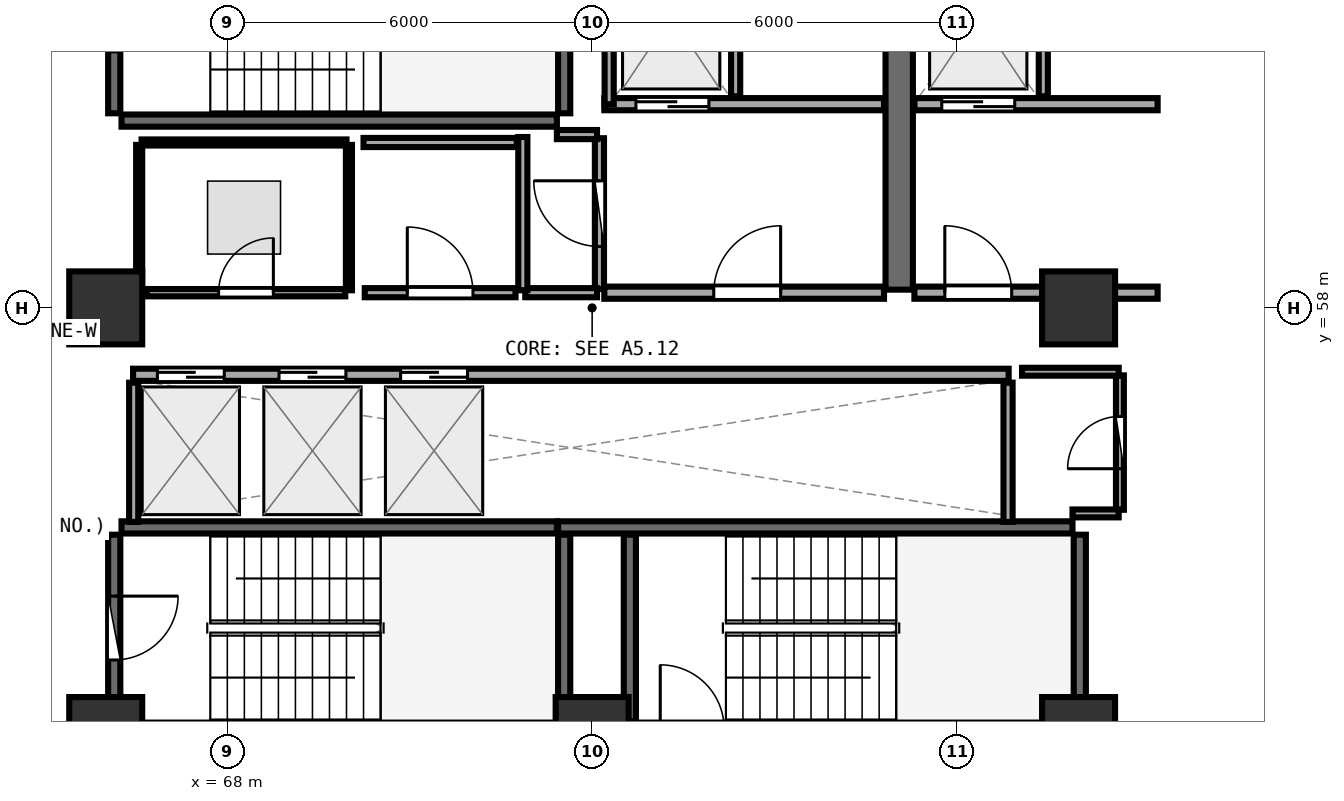
"""IFC4 building model, lengths in metres.
Left out: names, types, materials, properties, quantities, classifications, styles, units other than length and angle.
Written with IfcOpenShell. Run it as: python <this file> out.ifc"""

import sys

from ifc_helpers import new_model, si_unit, direction, frame, frame_2d, origin, origin_2d, place, context, subcontext, project, spatial, rectangle, extrude, element, fill, save


model = new_model("IFC4")
c1 = context("Model", 3, precision=1e-05, world=origin(), true_north=direction((0.0, 1.0)))
c2 = subcontext(c1, "Body", "Model", "MODEL_VIEW")
j1 = project(units=[si_unit("LENGTHUNIT", "METRE"), si_unit("PLANEANGLEUNIT", "RADIAN")], contexts=[c1])
p1 = place(None, origin())
s1 = spatial("IfcSite", under=j1, at=p1, CompositionType="ELEMENT")
p2 = place(p1, origin())
s2 = spatial("IfcBuilding", under=s1, at=p2, CompositionType="ELEMENT")
p3 = place(p2, frame((0.0, 0.0, 135.6)))
s3 = spatial("IfcBuildingStorey", under=s2, at=p3, CompositionType="ELEMENT", Elevation=135.6)
for number, where, z_axis, x_axis in (
    (1, (66.0, 51.0, 0.0), (0.0, 0.0, 1.0), (1.0, 0.0, 0.0)),
    (2, (74.0, 51.0, 0.0), (0.0, 0.0, 1.0), (1.0, 0.0, 0.0)),
    (3, (82.0, 51.0, 0.0), (0.0, 0.0, 1.0), (1.0, 0.0, 0.0)),
    (4, (82.0, 58.0, 0.0), (0.0, 0.0, 1.0), (1.0, 0.0, 0.0)),
    (5, (66.0, 58.0, 0.0), (0.0, 0.0, 1.0), (1.0, 0.0, 0.0)),
):
    element("IfcColumn", number, at=place(p3, frame(where, z_axis=z_axis, x_axis=x_axis)), inside=s3, PredefinedType="PILASTER", context=c2, shape_type="SweptSolid", body=[
        extrude(rectangle(XDim=1.2, YDim=1.2, at=origin_2d()), origin(), (0.0, 0.0, 1.0), 3.75),
    ])
p4 = place(p3, frame((66.26, 61.08, 0.0), z_axis=(0.0, 0.0, 1.0), x_axis=(1.0, 0.0, 0.0)))
e6 = element("IfcWall", 6, at=p4, inside=s3, PredefinedType="SHEAR", context=c2, shape_type="SweptSolid", body=[
    extrude(rectangle(XDim=7.16, YDim=0.2, at=frame_2d((3.58, 0.0))), origin(), (0.0, 0.0, 1.0), 3.49),
])
p5 = place(p3, frame((73.54, 61.2, 0.0), z_axis=(0.0, 0.0, 1.0), x_axis=(0.0, 1.0, 0.0)))
e7 = element("IfcWall", 7, at=p5, inside=s3, PredefinedType="SHEAR", context=c2, shape_type="SweptSolid", body=[
    extrude(rectangle(XDim=3.07, YDim=0.2, at=frame_2d((1.535, 0.0))), origin(), (0.0, 0.0, 1.0), 3.49),
])
p6 = place(p3, frame((66.14, 64.27, 0.0), z_axis=(0.0, 0.0, 1.0), x_axis=(0.0, -1.0, 0.0)))
e8 = element("IfcWall", 8, at=p6, inside=s3, PredefinedType="SHEAR", context=c2, shape_type="SweptSolid", body=[
    extrude(rectangle(XDim=3.07, YDim=0.2, at=frame_2d((1.535, 0.0))), origin(), (0.0, 0.0, 1.0), 3.49),
])
p7 = place(p6, frame((1.01, 0.0, 0.0)))
e9 = element("IfcOpeningElement", 9, at=p7, cuts=e8, PredefinedType="OPENING", context=c2, shape_type="SweptSolid", body=[
    extrude(rectangle(XDim=1.05, YDim=2.1, at=frame_2d((0.525, 1.05))), frame((0.0, 0.11, 0.0), z_axis=(0.0, -1.0, 0.0), x_axis=(1.0, 0.0, 0.0)), (0.0, 0.0, 1.0), 0.22),
])
p8 = place(p3, frame((82.02, 51.2, 0.0), z_axis=(0.0, 0.0, 1.0), x_axis=(0.0, 1.0, 0.0)))
e10 = element("IfcWall", 10, at=p8, inside=s3, PredefinedType="SHEAR", context=c2, shape_type="SweptSolid", body=[
    extrude(rectangle(XDim=3.07, YDim=0.2, at=frame_2d((1.535, 0.0))), origin(), (0.0, 0.0, 1.0), 3.49),
])
p9 = place(p3, frame((81.9, 54.39, 0.0), z_axis=(0.0, 0.0, 1.0), x_axis=(-1.0, 0.0, 0.0)))
e11 = element("IfcWall", 11, at=p9, inside=s3, PredefinedType="SHEAR", context=c2, shape_type="SweptSolid", body=[
    extrude(rectangle(XDim=8.46, YDim=0.2, at=frame_2d((4.23, 0.0))), origin(), (0.0, 0.0, 1.0), 3.49),
])
for number, where, z_axis, x_axis in (
    (12, (74.62, 54.27, 0.0), (0.0, 0.0, 1.0), (0.0, -1.0, 0.0)),
    (13, (73.54, 51.2, 0.0), (0.0, 0.0, 1.0), (0.0, 1.0, 0.0)),
):
    element("IfcWall", number, at=place(p3, frame(where, z_axis=z_axis, x_axis=x_axis)), inside=s3, PredefinedType="SHEAR", context=c2, shape_type="SweptSolid", body=[
        extrude(rectangle(XDim=3.07, YDim=0.2, at=frame_2d((1.535, 0.0))), origin(), (0.0, 0.0, 1.0), 3.49),
    ])
p10 = place(p3, frame((73.42, 54.39, 0.0), z_axis=(0.0, 0.0, 1.0), x_axis=(-1.0, 0.0, 0.0)))
e14 = element("IfcWall", 14, at=p10, inside=s3, PredefinedType="SHEAR", context=c2, shape_type="SweptSolid", body=[
    extrude(rectangle(XDim=7.16, YDim=0.2, at=frame_2d((3.58, 0.0))), origin(), (0.0, 0.0, 1.0), 3.49),
])
p11 = place(p3, frame((66.14, 54.27, 0.0), z_axis=(0.0, 0.0, 1.0), x_axis=(0.0, -1.0, 0.0)))
e15 = element("IfcWall", 15, at=p11, inside=s3, PredefinedType="SHEAR", context=c2, shape_type="SweptSolid", body=[
    extrude(rectangle(XDim=3.07, YDim=0.2, at=frame_2d((1.535, 0.0))), origin(), (0.0, 0.0, 1.0), 3.49),
])
p12 = place(p11, frame((1.01, 0.0, 0.0)))
e16 = element("IfcOpeningElement", 16, at=p12, cuts=e15, PredefinedType="OPENING", context=c2, shape_type="SweptSolid", body=[
    extrude(rectangle(XDim=1.05, YDim=2.1, at=frame_2d((0.525, 1.05))), frame((0.0, 0.11, 0.0), z_axis=(0.0, -1.0, 0.0), x_axis=(1.0, 0.0, 0.0)), (0.0, 0.0, 1.0), 0.22),
])
p13 = place(p3, frame((79.05, 58.3, 0.0), z_axis=(0.0, 0.0, 1.0), x_axis=(0.0, 1.0, 0.0)))
e17 = element("IfcWall", 17, at=p13, inside=s3, PredefinedType="SHEAR", context=c2, shape_type="SweptSolid", body=[
    extrude(rectangle(XDim=6.3, YDim=0.45, at=frame_2d((3.15, 0.0))), origin(), (0.0, 0.0, 1.0), 3.49),
])
p14 = place(p3, frame((74.2, 61.35, 0.0), z_axis=(0.0, 0.0, 1.0), x_axis=(1.0, 0.0, 0.0)))
e18 = element("IfcWall", 18, at=p14, inside=s3, PredefinedType="SOLIDWALL", context=c2, shape_type="SweptSolid", body=[
    extrude(rectangle(XDim=4.6, YDim=0.2, at=frame_2d((2.3, 0.0))), origin(), (0.0, 0.0, 1.0), 3.48),
])
p15 = place(p14, frame((0.52, 0.0, 0.0)))
e19 = element("IfcOpeningElement", 19, at=p15, cuts=e18, PredefinedType="OPENING", context=c2, shape_type="SweptSolid", body=[
    extrude(rectangle(XDim=1.2, YDim=2.15, at=frame_2d((0.6, 1.075))), frame((0.0, 0.11, 0.0), z_axis=(0.0, -1.0, 0.0), x_axis=(1.0, 0.0, 0.0)), (0.0, 0.0, 1.0), 0.22),
])
p16 = place(p3, frame((74.28, 61.35, 0.0), z_axis=(0.0, 0.0, 1.0), x_axis=(0.0, 1.0, 0.0)))
e20 = element("IfcWall", 20, at=p16, inside=s3, PredefinedType="PARTITIONING", context=c2, shape_type="SweptSolid", body=[
    extrude(rectangle(XDim=2.97, YDim=0.15, at=frame_2d((1.485, 0.0))), origin(), (0.0, 0.0, 1.0), 3.48),
])
p17 = place(p3, frame((76.36, 61.48, 0.0), z_axis=(0.0, 0.0, 1.0), x_axis=(0.0, 1.0, 0.0)))
e21 = element("IfcWall", 21, at=p17, inside=s3, PredefinedType="PARTITIONING", context=c2, shape_type="SweptSolid", body=[
    extrude(rectangle(XDim=2.84, YDim=0.15, at=frame_2d((1.42, 0.0))), origin(), (0.0, 0.0, 1.0), 3.48),
])
p18 = place(p3, frame((79.3, 61.35, 0.0), z_axis=(0.0, 0.0, 1.0), x_axis=(1.0, 0.0, 0.0)))
e22 = element("IfcWall", 22, at=p18, inside=s3, PredefinedType="SOLIDWALL", context=c2, shape_type="SweptSolid", body=[
    extrude(rectangle(XDim=4.0, YDim=0.2, at=frame_2d((2.0, 0.0))), origin(), (0.0, 0.0, 1.0), 2.775),
])
p19 = place(p18, frame((0.45, 0.0, 0.0)))
e23 = element("IfcOpeningElement", 23, at=p19, cuts=e22, PredefinedType="OPENING", context=c2, shape_type="SweptSolid", body=[
    extrude(rectangle(XDim=1.2, YDim=2.15, at=frame_2d((0.6, 1.075))), frame((0.0, 0.11, 0.0), z_axis=(0.0, -1.0, 0.0), x_axis=(1.0, 0.0, 0.0)), (0.0, 0.0, 1.0), 0.22),
])
p20 = place(p3, frame((81.42, 61.48, 0.0), z_axis=(0.0, 0.0, 1.0), x_axis=(0.0, 1.0, 0.0)))
e24 = element("IfcWall", 24, at=p20, inside=s3, PredefinedType="PARTITIONING", context=c2, shape_type="SweptSolid", body=[
    extrude(rectangle(XDim=2.84, YDim=0.15, at=frame_2d((1.42, 0.0))), origin(), (0.0, 0.0, 1.0), 3.48),
])
p21 = place(p3, frame((74.2, 58.25, 0.0), z_axis=(0.0, 0.0, 1.0), x_axis=(1.0, 0.0, 0.0)))
e25 = element("IfcWall", 25, at=p21, inside=s3, PredefinedType="SOLIDWALL", context=c2, shape_type="SweptSolid", body=[
    extrude(rectangle(XDim=4.6, YDim=0.2, at=frame_2d((2.3, 0.0))), origin(), (0.0, 0.0, 1.0), 3.48),
])
p22 = place(p21, frame((1.8, 0.0, 0.0)))
e26 = element("IfcOpeningElement", 26, at=p22, cuts=e25, PredefinedType="OPENING", context=c2, shape_type="SweptSolid", body=[
    extrude(rectangle(XDim=1.1, YDim=2.1, at=frame_2d((0.55, 1.05))), frame((0.0, 0.11, 0.0), z_axis=(0.0, -1.0, 0.0), x_axis=(1.0, 0.0, 0.0)), (0.0, 0.0, 1.0), 0.22),
])
p23 = place(p3, frame((79.3, 58.25, 0.0), z_axis=(0.0, 0.0, 1.0), x_axis=(1.0, 0.0, 0.0)))
e27 = element("IfcWall", 27, at=p23, inside=s3, PredefinedType="SOLIDWALL", context=c2, shape_type="SweptSolid", body=[
    extrude(rectangle(XDim=4.0, YDim=0.2, at=frame_2d((2.0, 0.0))), origin(), (0.0, 0.0, 1.0), 2.775),
])
p24 = place(p23, frame((0.5, 0.0, 0.0)))
e28 = element("IfcOpeningElement", 28, at=p24, cuts=e27, PredefinedType="OPENING", context=c2, shape_type="SweptSolid", body=[
    extrude(rectangle(XDim=1.1, YDim=2.1, at=frame_2d((0.55, 1.05))), frame((0.0, 0.11, 0.0), z_axis=(0.0, -1.0, 0.0), x_axis=(1.0, 0.0, 0.0)), (0.0, 0.0, 1.0), 0.22),
])
p25 = place(p3, frame((66.45, 56.9, 0.0), z_axis=(0.0, 0.0, 1.0), x_axis=(1.0, 0.0, 0.0)))
e29 = element("IfcWall", 29, at=p25, inside=s3, PredefinedType="SOLIDWALL", context=c2, shape_type="SweptSolid", body=[
    extrude(rectangle(XDim=14.4, YDim=0.2, at=frame_2d((7.2, 0.0))), origin(), (0.0, 0.0, 1.0), 3.48),
])
p26 = place(p25, frame((0.4, 0.0, 0.0)))
e30 = element("IfcOpeningElement", 30, at=p26, cuts=e29, PredefinedType="OPENING", context=c2, shape_type="SweptSolid", body=[
    extrude(rectangle(XDim=1.1, YDim=2.1, at=frame_2d((0.55, 1.05))), frame((0.0, 0.11, 0.0), z_axis=(0.0, -1.0, 0.0), x_axis=(1.0, 0.0, 0.0)), (0.0, 0.0, 1.0), 0.22),
])
p27 = place(p25, frame((2.4, 0.0, 0.0)))
e31 = element("IfcOpeningElement", 31, at=p27, cuts=e29, PredefinedType="OPENING", context=c2, shape_type="SweptSolid", body=[
    extrude(rectangle(XDim=1.1, YDim=2.1, at=frame_2d((0.55, 1.05))), frame((0.0, 0.11, 0.0), z_axis=(0.0, -1.0, 0.0), x_axis=(1.0, 0.0, 0.0)), (0.0, 0.0, 1.0), 0.22),
])
p28 = place(p25, frame((4.4, 0.0, 0.0)))
e32 = element("IfcOpeningElement", 32, at=p28, cuts=e29, PredefinedType="OPENING", context=c2, shape_type="SweptSolid", body=[
    extrude(rectangle(XDim=1.1, YDim=2.1, at=frame_2d((0.55, 1.05))), frame((0.0, 0.11, 0.0), z_axis=(0.0, -1.0, 0.0), x_axis=(1.0, 0.0, 0.0)), (0.0, 0.0, 1.0), 0.22),
])
for number, where, z_axis, x_axis in (
    (33, (66.46, 54.48, 0.0), (0.0, 0.0, 1.0), (0.0, 1.0, 0.0)),
    (34, (80.84, 54.48, 0.0), (0.0, 0.0, 1.0), (0.0, 1.0, 0.0)),
):
    element("IfcWall", number, at=place(p3, frame(where, z_axis=z_axis, x_axis=x_axis)), inside=s3, PredefinedType="PARTITIONING", context=c2, shape_type="SweptSolid", body=[
        extrude(rectangle(XDim=2.29, YDim=0.15, at=frame_2d((1.145, 0.0))), origin(), (0.0, 0.0, 1.0), 3.48),
    ])
p29 = place(p3, frame((74.12, 58.31, 0.0), z_axis=(0.0, 0.0, 1.0), x_axis=(0.0, 1.0, 0.0)))
e35 = element("IfcWall", 35, at=p29, inside=s3, PredefinedType="PARTITIONING", context=c2, shape_type="SweptSolid", body=[
    extrude(rectangle(XDim=2.48, YDim=0.15, at=frame_2d((1.24, 0.0))), origin(), (0.0, 0.0, 1.0), 3.48),
])
p30 = place(p29, frame((0.7, 0.0, 0.0)))
e36 = element("IfcOpeningElement", 36, at=p30, cuts=e35, PredefinedType="OPENING", context=c2, shape_type="SweptSolid", body=[
    extrude(rectangle(XDim=1.08, YDim=2.1, at=frame_2d((0.54, 1.05))), frame((0.0, 0.085, 0.0), z_axis=(0.0, -1.0, 0.0), x_axis=(1.0, 0.0, 0.0)), (0.0, 0.0, 1.0), 0.17),
])
p31 = place(p3, frame((82.68, 54.68, 0.0), z_axis=(0.0, 0.0, 1.0), x_axis=(0.0, 1.0, 0.0)))
e37 = element("IfcWall", 37, at=p31, inside=s3, PredefinedType="PLUMBINGWALL", context=c2, shape_type="SweptSolid", body=[
    extrude(rectangle(XDim=2.21, YDim=0.13, at=frame_2d((1.105, 0.0))), origin(), (0.0, 0.0, 1.0), 3.48),
])
p32 = place(p31, frame((0.675, 0.0, 0.0)))
e38 = element("IfcOpeningElement", 38, at=p32, cuts=e37, PredefinedType="OPENING", context=c2, shape_type="SweptSolid", body=[
    extrude(rectangle(XDim=0.86, YDim=2.05, at=frame_2d((0.43, 1.025))), frame((0.0, 0.075, 0.0), z_axis=(0.0, -1.0, 0.0), x_axis=(1.0, 0.0, 0.0)), (0.0, 0.0, 1.0), 0.15),
])
p33 = place(p3, frame((66.675, 58.25, 0.0), z_axis=(0.0, 0.0, 1.0), x_axis=(1.0, 0.0, 0.0)))
e39 = element("IfcWall", 39, at=p33, inside=s3, PredefinedType="PARTITIONING", context=c2, shape_type="SweptSolid", body=[
    extrude(rectangle(XDim=3.265, YDim=0.12, at=frame_2d((1.632, 0.0))), origin(), (0.0, 0.0, 1.0), 3.48),
])
p34 = place(p33, frame((1.182, 0.0, 0.0)))
e40 = element("IfcOpeningElement", 40, at=p34, cuts=e39, PredefinedType="OPENING", context=c2, shape_type="SweptSolid", body=[
    extrude(rectangle(XDim=0.9, YDim=2.08, at=frame_2d((0.45, 1.04))), frame((0.0, 0.07, 0.0), z_axis=(0.0, -1.0, 0.0), x_axis=(1.0, 0.0, 0.0)), (0.0, 0.0, 1.0), 0.14),
])
p35 = place(p3, frame((70.26, 58.25, 0.0), z_axis=(0.0, 0.0, 1.0), x_axis=(1.0, 0.0, 0.0)))
e41 = element("IfcWall", 41, at=p35, inside=s3, PredefinedType="PARTITIONING", context=c2, shape_type="SweptSolid", body=[
    extrude(rectangle(XDim=2.48, YDim=0.15, at=frame_2d((1.24, 0.0))), origin(), (0.0, 0.0, 1.0), 3.48),
])
p36 = place(p35, frame((0.7, 0.0, 0.0)))
e42 = element("IfcOpeningElement", 42, at=p36, cuts=e41, PredefinedType="OPENING", context=c2, shape_type="SweptSolid", body=[
    extrude(rectangle(XDim=1.08, YDim=2.1, at=frame_2d((0.54, 1.05))), frame((0.0, 0.085, 0.0), z_axis=(0.0, -1.0, 0.0), x_axis=(1.0, 0.0, 0.0)), (0.0, 0.0, 1.0), 0.17),
])
p37 = place(p3, frame((72.9, 58.25, 0.0), z_axis=(0.0, 0.0, 1.0), x_axis=(1.0, 0.0, 0.0)))
e43 = element("IfcWall", 43, at=p37, inside=s3, PredefinedType="PARTITIONING", context=c2, shape_type="SweptSolid", body=[
    extrude(rectangle(XDim=1.18, YDim=0.15, at=frame_2d((0.59, 0.0))), origin(), (0.0, 0.0, 1.0), 3.48),
])
p38 = place(p3, frame((74.08, 60.85, 0.0), z_axis=(0.0, 0.0, 1.0), x_axis=(-1.0, 0.0, 0.0)))
e44 = element("IfcWall", 44, at=p38, inside=s3, PredefinedType="PARTITIONING", context=c2, shape_type="SweptSolid", body=[
    extrude(rectangle(XDim=0.66, YDim=0.15, at=frame_2d((0.33, 0.0))), origin(), (0.0, 0.0, 1.0), 3.48),
])
p39 = place(p3, frame((72.86, 60.81, 0.0), z_axis=(0.0, 0.0, 1.0), x_axis=(0.0, -1.0, 0.0)))
e45 = element("IfcWall", 45, at=p39, inside=s3, PredefinedType="PARTITIONING", context=c2, shape_type="SweptSolid", body=[
    extrude(rectangle(XDim=2.52, YDim=0.15, at=frame_2d((1.26, 0.0))), origin(), (0.0, 0.0, 1.0), 3.48),
])
p40 = place(p3, frame((81.9, 54.62, 0.0), z_axis=(0.0, 0.0, 1.0), x_axis=(1.0, 0.0, 0.0)))
e46 = element("IfcWall", 46, at=p40, inside=s3, PredefinedType="PLUMBINGWALL", context=c2, shape_type="SweptSolid", body=[
    extrude(rectangle(XDim=0.76, YDim=0.13, at=frame_2d((0.38, 0.0))), origin(), (0.0, 0.0, 1.0), 2.775),
])
p41 = place(p3, frame((82.66, 56.95, 0.0), z_axis=(0.0, 0.0, 1.0), x_axis=(-1.0, 0.0, 0.0)))
e47 = element("IfcWall", 47, at=p41, inside=s3, PredefinedType="PLUMBINGWALL", context=c2, shape_type="SweptSolid", body=[
    extrude(rectangle(XDim=1.59, YDim=0.13, at=frame_2d((0.795, 0.0))), origin(), (0.0, 0.0, 1.0), 2.775),
])
p42 = place(p3, frame((70.0, 58.29, 0.0), z_axis=(0.0, 0.0, 1.0), x_axis=(0.0, 1.0, 0.0)))
e48 = element("IfcWall", 48, at=p42, inside=s3, PredefinedType="PARTITIONING", context=c2, shape_type="SweptSolid", body=[
    extrude(rectangle(XDim=2.39, YDim=0.1, at=frame_2d((1.195, 0.0))), origin(), (0.0, 0.0, 1.0), 3.48),
])
p43 = place(p3, frame((69.96, 60.72, 0.0), z_axis=(0.0, 0.0, 1.0), x_axis=(-1.0, 0.0, 0.0)))
e49 = element("IfcWall", 49, at=p43, inside=s3, PredefinedType="PARTITIONING", context=c2, shape_type="SweptSolid", body=[
    extrude(rectangle(XDim=3.37, YDim=0.1, at=frame_2d((1.685, 0.0))), origin(), (0.0, 0.0, 1.0), 3.48),
])
p44 = place(p3, frame((66.55, 60.68, 0.0), z_axis=(0.0, 0.0, 1.0), x_axis=(0.0, -1.0, 0.0)))
e50 = element("IfcWall", 50, at=p44, inside=s3, PredefinedType="PARTITIONING", context=c2, shape_type="SweptSolid", body=[
    extrude(rectangle(XDim=2.383, YDim=0.1, at=frame_2d((1.191, 0.0))), origin(), (0.0, 0.0, 1.0), 3.48),
])
p45 = place(p3, frame((72.76, 60.72, 0.0), z_axis=(0.0, 0.0, 1.0), x_axis=(-1.0, 0.0, 0.0)))
e51 = element("IfcWall", 51, at=p45, inside=s3, PredefinedType="PARTITIONING", context=c2, shape_type="SweptSolid", body=[
    extrude(rectangle(XDim=2.52, YDim=0.15, at=frame_2d((1.26, 0.0))), origin(), (0.0, 0.0, 1.0), 3.48),
])
p46 = place(p3, frame((83.0, 48.57, 0.0), z_axis=(0.0, 0.0, 1.0), x_axis=(0.688528308603, 0.725209465088, 0.0)))
e52 = element("IfcWall", 52, at=p46, inside=s3, PredefinedType="PARTITIONING", context=c2, shape_type="SweptSolid", body=[
    extrude(rectangle(XDim=4.033, YDim=0.1, at=frame_2d((2.017, 0.0))), origin(), (0.0, 0.0, 1.0), 2.975),
])
p47 = place(p3, frame((87.749, 59.227, 0.0), z_axis=(0.0, 0.0, 1.0), x_axis=(-0.431199882011, 0.902256427937, 0.0)))
e53 = element("IfcWall", 53, at=p47, inside=s3, PredefinedType="PARTITIONING", context=c2, shape_type="SweptSolid", body=[
    extrude(rectangle(XDim=7.638, YDim=0.1, at=frame_2d((3.819, 0.0))), origin(), (0.0, 0.0, 1.0), 2.975),
])
p48 = place(p12, origin())
e54 = element("IfcDoor", 54, at=p48, inside=s3, OperationType="SINGLE_SWING_LEFT", PredefinedType="DOOR", context=c2, shape_type="SweptSolid", body=[
    extrude(rectangle(XDim=1.05, YDim=2.1, at=frame_2d((0.525, 1.05))), frame((0.0, 0.025, 0.0), z_axis=(0.0, -1.0, 0.0), x_axis=(1.0, 0.0, 0.0)), (0.0, 0.0, 1.0), 0.05),
])
fill(e16, e54)
p49 = place(p15, origin())
e55 = element("IfcDoor", 55, at=p49, inside=s3, OperationType="DOUBLE_DOOR_SLIDING", PredefinedType="DOOR", context=c2, shape_type="SweptSolid", body=[
    extrude(rectangle(XDim=1.2, YDim=2.15, at=frame_2d((0.6, 1.075))), frame((0.0, 0.025, 0.0), z_axis=(0.0, -1.0, 0.0), x_axis=(1.0, 0.0, 0.0)), (0.0, 0.0, 1.0), 0.05),
])
fill(e19, e55)
p50 = place(p19, origin())
e56 = element("IfcDoor", 56, at=p50, inside=s3, OperationType="DOUBLE_DOOR_SLIDING", PredefinedType="DOOR", context=c2, shape_type="SweptSolid", body=[
    extrude(rectangle(XDim=1.2, YDim=2.15, at=frame_2d((0.6, 1.075))), frame((0.0, 0.025, 0.0), z_axis=(0.0, -1.0, 0.0), x_axis=(1.0, 0.0, 0.0)), (0.0, 0.0, 1.0), 0.05),
])
fill(e23, e56)
p51 = place(p22, frame((1.1, 0.0, 0.0), z_axis=(0.0, 0.0, 1.0), x_axis=(-1.0, 0.0, 0.0)))
e57 = element("IfcDoor", 57, at=p51, inside=s3, OperationType="SINGLE_SWING_LEFT", PredefinedType="DOOR", context=c2, shape_type="SweptSolid", body=[
    extrude(rectangle(XDim=1.1, YDim=2.1, at=frame_2d((0.55, 1.05))), frame((0.0, 0.025, 0.0), z_axis=(0.0, -1.0, 0.0), x_axis=(1.0, 0.0, 0.0)), (0.0, 0.0, 1.0), 0.05),
])
fill(e26, e57)
p52 = place(p24, frame((1.1, 0.0, 0.0), z_axis=(0.0, 0.0, 1.0), x_axis=(-1.0, 0.0, 0.0)))
e58 = element("IfcDoor", 58, at=p52, inside=s3, OperationType="SINGLE_SWING_RIGHT", PredefinedType="DOOR", context=c2, shape_type="SweptSolid", body=[
    extrude(rectangle(XDim=1.1, YDim=2.1, at=frame_2d((0.55, 1.05))), frame((0.0, 0.025, 0.0), z_axis=(0.0, -1.0, 0.0), x_axis=(1.0, 0.0, 0.0)), (0.0, 0.0, 1.0), 0.05),
])
fill(e28, e58)
p53 = place(p26, origin())
e59 = element("IfcDoor", 59, at=p53, inside=s3, OperationType="DOUBLE_DOOR_SLIDING", PredefinedType="DOOR", context=c2, shape_type="SweptSolid", body=[
    extrude(rectangle(XDim=1.1, YDim=2.1, at=frame_2d((0.55, 1.05))), frame((0.0, 0.025, 0.0), z_axis=(0.0, -1.0, 0.0), x_axis=(1.0, 0.0, 0.0)), (0.0, 0.0, 1.0), 0.05),
])
fill(e30, e59)
p54 = place(p27, origin())
e60 = element("IfcDoor", 60, at=p54, inside=s3, OperationType="DOUBLE_DOOR_SLIDING", PredefinedType="DOOR", context=c2, shape_type="SweptSolid", body=[
    extrude(rectangle(XDim=1.1, YDim=2.1, at=frame_2d((0.55, 1.05))), frame((0.0, 0.025, 0.0), z_axis=(0.0, -1.0, 0.0), x_axis=(1.0, 0.0, 0.0)), (0.0, 0.0, 1.0), 0.05),
])
fill(e31, e60)
p55 = place(p28, origin())
e61 = element("IfcDoor", 61, at=p55, inside=s3, OperationType="DOUBLE_DOOR_SLIDING", PredefinedType="DOOR", context=c2, shape_type="SweptSolid", body=[
    extrude(rectangle(XDim=1.1, YDim=2.1, at=frame_2d((0.55, 1.05))), frame((0.0, 0.025, 0.0), z_axis=(0.0, -1.0, 0.0), x_axis=(1.0, 0.0, 0.0)), (0.0, 0.0, 1.0), 0.05),
])
fill(e32, e61)
p56 = place(p30, origin())
e62 = element("IfcDoor", 62, at=p56, inside=s3, OperationType="SINGLE_SWING_RIGHT", PredefinedType="DOOR", context=c2, shape_type="SweptSolid", body=[
    extrude(rectangle(XDim=1.08, YDim=2.1, at=frame_2d((0.54, 1.05))), frame((0.0, 0.025, 0.0), z_axis=(0.0, -1.0, 0.0), x_axis=(1.0, 0.0, 0.0)), (0.0, 0.0, 1.0), 0.05),
])
fill(e36, e62)
p57 = place(p32, origin())
e63 = element("IfcDoor", 63, at=p57, inside=s3, OperationType="SINGLE_SWING_LEFT", PredefinedType="DOOR", context=c2, shape_type="SweptSolid", body=[
    extrude(rectangle(XDim=0.86, YDim=2.05, at=frame_2d((0.43, 1.025))), frame((0.0, 0.025, 0.0), z_axis=(0.0, -1.0, 0.0), x_axis=(1.0, 0.0, 0.0)), (0.0, 0.0, 1.0), 0.05),
])
fill(e38, e63)
p58 = place(p34, origin())
e64 = element("IfcDoor", 64, at=p58, inside=s3, OperationType="SINGLE_SWING_RIGHT", PredefinedType="DOOR", context=c2, shape_type="SweptSolid", body=[
    extrude(rectangle(XDim=0.9, YDim=2.08, at=frame_2d((0.45, 1.04))), frame((0.0, 0.025, 0.0), z_axis=(0.0, -1.0, 0.0), x_axis=(1.0, 0.0, 0.0)), (0.0, 0.0, 1.0), 0.05),
])
fill(e40, e64)
p59 = place(p36, origin())
e65 = element("IfcDoor", 65, at=p59, inside=s3, OperationType="SINGLE_SWING_LEFT", PredefinedType="DOOR", context=c2, shape_type="SweptSolid", body=[
    extrude(rectangle(XDim=1.08, YDim=2.1, at=frame_2d((0.54, 1.05))), frame((0.0, 0.025, 0.0), z_axis=(0.0, -1.0, 0.0), x_axis=(1.0, 0.0, 0.0)), (0.0, 0.0, 1.0), 0.05),
])
fill(e42, e65)
save(model, sys.argv[1])
